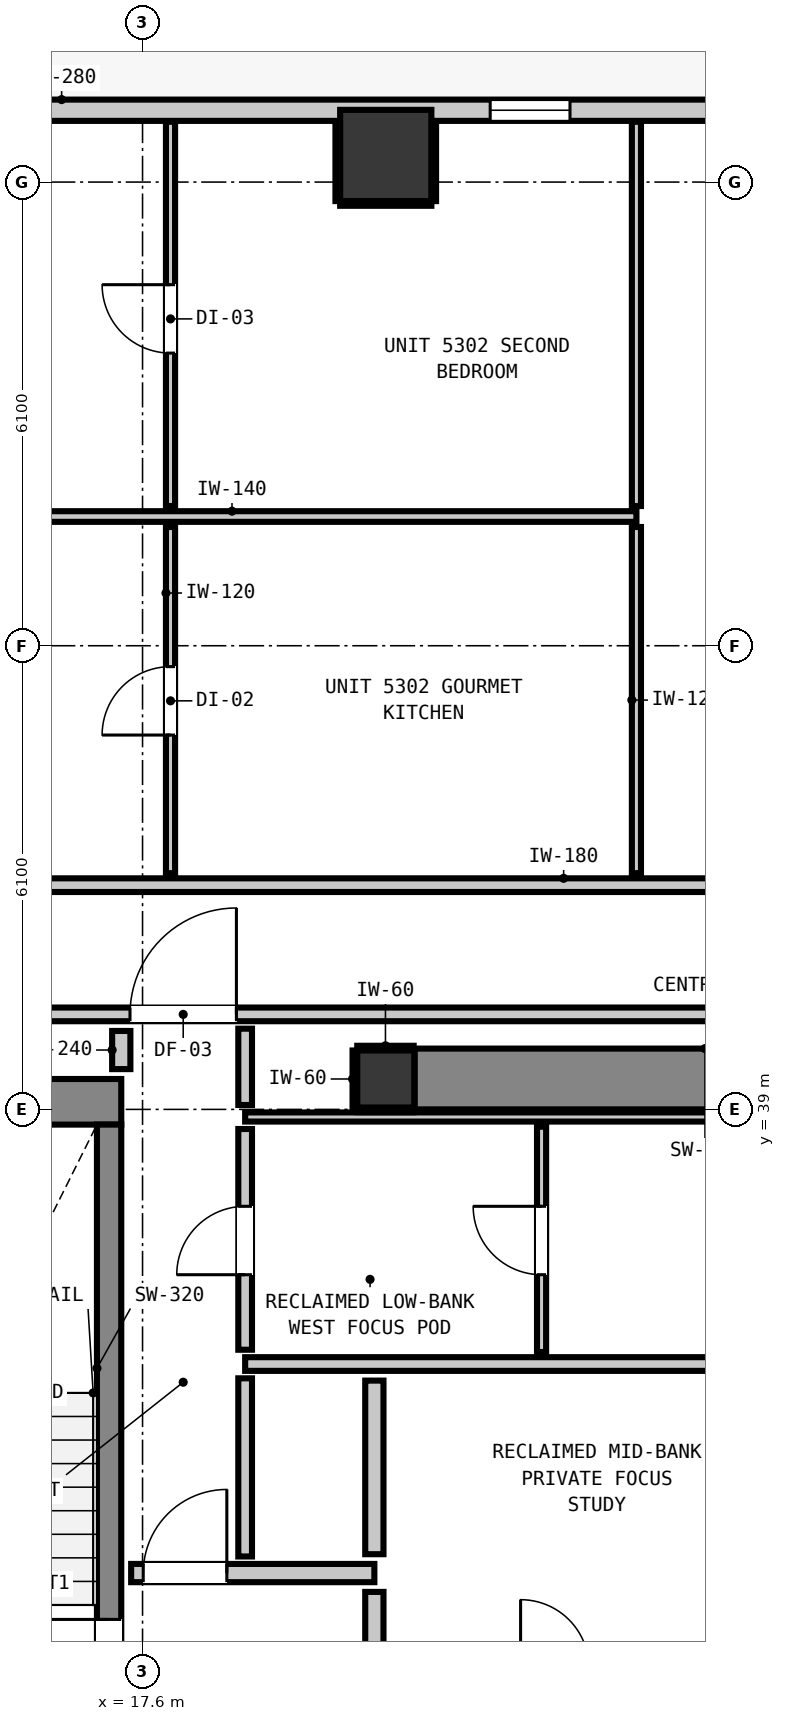
"""IFC4 building model, lengths in metres.
Left out: names, types, materials, properties, quantities, classifications, styles, units other than length and angle.
Written with IfcOpenShell. Run it as: python <this file> out.ifc"""

import sys

from ifc_helpers import new_model, si_unit, direction, frame, frame_2d, origin, origin_2d, place, context, subcontext, project, spatial, rectangle, extrude, element, fill, save


model = new_model("IFC4")
c1 = context("Model", 3, precision=1e-05, world=origin(), true_north=direction((0.0, 1.0)))
c2 = subcontext(c1, "Body", "Model", "MODEL_VIEW")
j1 = project(units=[si_unit("LENGTHUNIT", "METRE"), si_unit("PLANEANGLEUNIT", "RADIAN")], contexts=[c1])
p1 = place(None, origin())
s1 = spatial("IfcSite", under=j1, at=p1, CompositionType="ELEMENT")
p2 = place(p1, origin())
s2 = spatial("IfcBuilding", under=s1, at=p2, CompositionType="ELEMENT")
p3 = place(p2, frame((0.0, 0.0, 183.52)))
s3 = spatial("IfcBuildingStorey", under=s2, at=p3, CompositionType="ELEMENT", Elevation=183.52)
p4 = place(p3, frame((20.8, 39.4, 0.0), z_axis=(0.0, 0.0, 1.0), x_axis=(1.0, 0.0, 0.0)))
e1 = element("IfcColumn", 1, at=p4, inside=s3, PredefinedType="COLUMN", context=c2, shape_type="SweptSolid", body=[
    extrude(rectangle(XDim=0.75, YDim=0.75, at=origin_2d()), origin(), (0.0, 0.0, 1.0), 3.32),
])
p5 = place(p3, frame((13.24, 39.1, 0.0), z_axis=(0.0, 0.0, 1.0), x_axis=(1.0, 0.0, 0.0)))
e2 = element("IfcWall", 2, at=p5, inside=s3, PredefinedType="SHEAR", context=c2, shape_type="SweptSolid", body=[
    extrude(rectangle(XDim=4.08, YDim=0.6, at=frame_2d((2.04, 0.0))), origin(), (0.0, 0.0, 1.0), 3.32),
])
p6 = place(p3, frame((21.18, 39.4, 0.0), z_axis=(0.0, 0.0, 1.0), x_axis=(1.0, 0.0, 0.0)))
e3 = element("IfcWall", 3, at=p6, inside=s3, PredefinedType="SHEAR", context=c2, shape_type="SweptSolid", body=[
    extrude(rectangle(XDim=7.64, YDim=0.8, at=frame_2d((3.82, 0.0))), origin(), (0.0, 0.0, 1.0), 3.32),
])
p7 = place(p3, frame((17.16, 31.0, 0.0), z_axis=(0.0, 0.0, 1.0), x_axis=(0.0, 1.0, 0.0)))
e4 = element("IfcWall", 4, at=p7, inside=s3, PredefinedType="SHEAR", context=c2, shape_type="SweptSolid", body=[
    extrude(rectangle(XDim=7.8, YDim=0.32, at=frame_2d((3.9, 0.0))), origin(), (0.0, 0.0, 1.0), 3.32),
])
p8 = place(p7, frame((0.19, 0.0, 0.0)))
e5 = element("IfcOpeningElement", 5, at=p8, cuts=e4, PredefinedType="OPENING", context=c2, shape_type="SweptSolid", body=[
    extrude(rectangle(XDim=1.1, YDim=2.15, at=frame_2d((0.55, 1.075))), frame((0.0, 0.17, 0.0), z_axis=(0.0, -1.0, 0.0), x_axis=(1.0, 0.0, 0.0)), (0.0, 0.0, 1.0), 0.34),
])
p9 = place(p3, frame((20.8, 51.55, 0.0), z_axis=(0.0, 0.0, 1.0), x_axis=(1.0, 0.0, 0.0)))
e6 = element("IfcColumn", 6, at=p9, inside=s3, PredefinedType="COLUMN", context=c2, shape_type="SweptSolid", body=[
    extrude(rectangle(XDim=1.2, YDim=1.2, at=origin_2d()), origin(), (0.0, 0.0, 1.0), 3.32),
])
p10 = place(p3, frame((5.355, 52.145, 0.0), z_axis=(0.0, 0.0, 1.0), x_axis=(1.0, 0.0, 0.0)))
e7 = element("IfcWall", 7, at=p10, inside=s3, PredefinedType="STANDARD", context=c2, shape_type="SweptSolid", body=[
    extrude(rectangle(XDim=35.09, YDim=0.28, at=frame_2d((17.545, 0.0))), origin(), (0.0, 0.0, 1.0), 3.08),
])
p11 = place(p10, frame((0.904, 0.0, 0.0)))
e8 = element("IfcOpeningElement", 8, at=p11, cuts=e7, PredefinedType="OPENING", context=c2, shape_type="SweptSolid", body=[
    extrude(rectangle(XDim=1.0, YDim=2.15, at=frame_2d((0.5, 1.075))), frame((0.0, 0.15, 0.0), z_axis=(0.0, -1.0, 0.0), x_axis=(1.0, 0.0, 0.0)), (0.0, 0.0, 1.0), 0.3),
])
p12 = place(p10, frame((4.492, 0.0, 0.85)))
e9 = element("IfcOpeningElement", 9, at=p12, cuts=e7, PredefinedType="OPENING", context=c2, shape_type="SweptSolid", body=[
    extrude(rectangle(XDim=1.05, YDim=1.65, at=frame_2d((0.525, 0.825))), frame((0.0, 0.15, 0.0), z_axis=(0.0, -1.0, 0.0), x_axis=(1.0, 0.0, 0.0)), (0.0, 0.0, 1.0), 0.3),
])
p13 = place(p10, frame((16.819, 0.0, 0.85)))
e10 = element("IfcOpeningElement", 10, at=p13, cuts=e7, PredefinedType="OPENING", context=c2, shape_type="SweptSolid", body=[
    extrude(rectangle(XDim=1.05, YDim=1.65, at=frame_2d((0.525, 0.825))), frame((0.0, 0.15, 0.0), z_axis=(0.0, -1.0, 0.0), x_axis=(1.0, 0.0, 0.0)), (0.0, 0.0, 1.0), 0.3),
])
p14 = place(p10, frame((26.97, 0.0, 0.85)))
e11 = element("IfcOpeningElement", 11, at=p14, cuts=e7, PredefinedType="OPENING", context=c2, shape_type="SweptSolid", body=[
    extrude(rectangle(XDim=1.05, YDim=1.65, at=frame_2d((0.525, 0.825))), frame((0.0, 0.15, 0.0), z_axis=(0.0, -1.0, 0.0), x_axis=(1.0, 0.0, 0.0)), (0.0, 0.0, 1.0), 0.3),
])
p15 = place(p3, frame((17.45, 32.9, 0.0), z_axis=(0.0, 0.0, 1.0), x_axis=(1.0, 0.0, 0.0)))
e12 = element("IfcWall", 12, at=p15, inside=s3, PredefinedType="PARTITIONING", context=c2, shape_type="SweptSolid", body=[
    extrude(rectangle(XDim=3.2, YDim=0.24, at=frame_2d((1.6, 0.0))), origin(), (0.0, 0.0, 1.0), 3.08),
])
p16 = place(p15, frame((0.159, 0.0, 0.0)))
e13 = element("IfcOpeningElement", 13, at=p16, cuts=e12, PredefinedType="OPENING", context=c2, shape_type="SweptSolid", body=[
    extrude(rectangle(XDim=1.1, YDim=2.15, at=frame_2d((0.55, 1.075))), frame((0.0, 0.13, 0.0), z_axis=(0.0, -1.0, 0.0), x_axis=(1.0, 0.0, 0.0)), (0.0, 0.0, 1.0), 0.26),
])
p17 = place(p3, frame((18.95, 35.65, 0.0), z_axis=(0.0, 0.0, 1.0), x_axis=(1.0, 0.0, 0.0)))
e14 = element("IfcWall", 14, at=p17, inside=s3, PredefinedType="PARTITIONING", context=c2, shape_type="SweptSolid", body=[
    extrude(rectangle(XDim=11.025, YDim=0.18, at=frame_2d((5.513, 0.0))), origin(), (0.0, 0.0, 1.0), 3.08),
])
p18 = place(p3, frame((3.207, 40.25, 0.0), z_axis=(0.0, 0.0, 1.0), x_axis=(1.0, 0.0, 0.0)))
e15 = element("IfcWall", 15, at=p18, inside=s3, PredefinedType="PARTITIONING", context=c2, shape_type="SweptSolid", body=[
    extrude(rectangle(XDim=39.386, YDim=0.18, at=frame_2d((19.693, 0.0))), origin(), (0.0, 0.0, 1.0), 3.08),
])
p19 = place(p18, frame((14.228, 0.0, 0.0)))
e16 = element("IfcOpeningElement", 16, at=p19, cuts=e15, PredefinedType="OPENING", context=c2, shape_type="SweptSolid", body=[
    extrude(rectangle(XDim=1.4, YDim=2.15, at=frame_2d((0.7, 1.075))), frame((0.0, 0.1, 0.0), z_axis=(0.0, -1.0, 0.0), x_axis=(1.0, 0.0, 0.0)), (0.0, 0.0, 1.0), 0.2),
])
p20 = place(p18, frame((1.267, 0.0, 0.0)))
e17 = element("IfcOpeningElement", 17, at=p20, cuts=e15, PredefinedType="OPENING", context=c2, shape_type="SweptSolid", body=[
    extrude(rectangle(XDim=0.9, YDim=2.1, at=frame_2d((0.45, 1.05))), frame((0.0, 0.1, 0.0), z_axis=(0.0, -1.0, 0.0), x_axis=(1.0, 0.0, 0.0)), (0.0, 0.0, 1.0), 0.2),
])
p21 = place(p18, frame((5.694, 0.0, 0.0)))
e18 = element("IfcOpeningElement", 18, at=p21, cuts=e15, PredefinedType="OPENING", context=c2, shape_type="SweptSolid", body=[
    extrude(rectangle(XDim=0.95, YDim=2.1, at=frame_2d((0.475, 1.05))), frame((0.0, 0.1, 0.0), z_axis=(0.0, -1.0, 0.0), x_axis=(1.0, 0.0, 0.0)), (0.0, 0.0, 1.0), 0.2),
])
p22 = place(p18, frame((36.494, 0.0, 0.0)))
e19 = element("IfcOpeningElement", 19, at=p22, cuts=e15, PredefinedType="OPENING", context=c2, shape_type="SweptSolid", body=[
    extrude(rectangle(XDim=0.9, YDim=2.1, at=frame_2d((0.45, 1.05))), frame((0.0, 0.1, 0.0), z_axis=(0.0, -1.0, 0.0), x_axis=(1.0, 0.0, 0.0)), (0.0, 0.0, 1.0), 0.2),
])
p23 = place(p3, frame((3.207, 41.95, 0.0), z_axis=(0.0, 0.0, 1.0), x_axis=(1.0, 0.0, 0.0)))
e20 = element("IfcWall", 20, at=p23, inside=s3, PredefinedType="PARTITIONING", context=c2, shape_type="SweptSolid", body=[
    extrude(rectangle(XDim=39.386, YDim=0.18, at=frame_2d((19.693, 0.0))), origin(), (0.0, 0.0, 1.0), 3.08),
])
p24 = place(p23, frame((9.199, 0.0, 0.0)))
e21 = element("IfcOpeningElement", 21, at=p24, cuts=e20, PredefinedType="OPENING", context=c2, shape_type="SweptSolid", body=[
    extrude(rectangle(XDim=1.0, YDim=2.15, at=frame_2d((0.5, 1.075))), frame((0.0, 0.1, 0.0), z_axis=(0.0, -1.0, 0.0), x_axis=(1.0, 0.0, 0.0)), (0.0, 0.0, 1.0), 0.2),
])
p25 = place(p23, frame((29.668, 0.0, 0.0)))
e22 = element("IfcOpeningElement", 22, at=p25, cuts=e20, PredefinedType="OPENING", context=c2, shape_type="SweptSolid", body=[
    extrude(rectangle(XDim=0.9, YDim=2.1, at=frame_2d((0.45, 1.05))), frame((0.0, 0.1, 0.0), z_axis=(0.0, -1.0, 0.0), x_axis=(1.0, 0.0, 0.0)), (0.0, 0.0, 1.0), 0.2),
])
p26 = place(p3, frame((3.207, 46.8, 0.0), z_axis=(0.0, 0.0, 1.0), x_axis=(1.0, 0.0, 0.0)))
e23 = element("IfcWall", 23, at=p26, inside=s3, PredefinedType="PARTITIONING", context=c2, shape_type="SweptSolid", body=[
    extrude(rectangle(XDim=20.891, YDim=0.14, at=frame_2d((10.445, 0.0))), origin(), (0.0, 0.0, 1.0), 3.08),
])
p27 = place(p26, frame((9.249, 0.0, 0.0)))
e24 = element("IfcOpeningElement", 24, at=p27, cuts=e23, PredefinedType="OPENING", context=c2, shape_type="SweptSolid", body=[
    extrude(rectangle(XDim=0.9, YDim=2.1, at=frame_2d((0.45, 1.05))), frame((0.0, 0.08, 0.0), z_axis=(0.0, -1.0, 0.0), x_axis=(1.0, 0.0, 0.0)), (0.0, 0.0, 1.0), 0.16),
])
p28 = place(p3, frame((18.95, 38.9, 0.0), z_axis=(0.0, 0.0, 1.0), x_axis=(1.0, 0.0, 0.0)))
e25 = element("IfcWall", 25, at=p28, inside=s3, PredefinedType="PARTITIONING", context=c2, shape_type="SweptSolid", body=[
    extrude(rectangle(XDim=11.025, YDim=0.12, at=frame_2d((5.513, 0.0))), origin(), (0.0, 0.0, 1.0), 3.08),
])
p29 = place(p3, frame((17.32, 39.53, 0.0), z_axis=(0.0, 0.0, 1.0), x_axis=(0.0, 1.0, 0.0)))
e26 = element("IfcWall", 26, at=p29, inside=s3, PredefinedType="PARTITIONING", context=c2, shape_type="SweptSolid", body=[
    extrude(rectangle(XDim=0.502, YDim=0.24, at=frame_2d((0.251, 0.0))), origin(), (0.0, 0.0, 1.0), 3.08),
])
p30 = place(p3, frame((20.65, 31.868, 0.0), z_axis=(0.0, 0.0, 1.0), x_axis=(0.0, 1.0, 0.0)))
e27 = element("IfcWall", 27, at=p30, inside=s3, PredefinedType="PARTITIONING", context=c2, shape_type="SweptSolid", body=[
    extrude(rectangle(XDim=0.784, YDim=0.24, at=frame_2d((0.392, 0.0))), origin(), (0.0, 0.0, 1.0), 2.315),
])
p31 = place(p3, frame((20.65, 33.148, 0.0), z_axis=(0.0, 0.0, 1.0), x_axis=(0.0, 1.0, 0.0)))
e28 = element("IfcWall", 28, at=p31, inside=s3, PredefinedType="PARTITIONING", context=c2, shape_type="SweptSolid", body=[
    extrude(rectangle(XDim=2.284, YDim=0.24, at=frame_2d((1.142, 0.0))), origin(), (0.0, 0.0, 1.0), 2.315),
])
p32 = place(p3, frame((18.95, 33.118, 0.0), z_axis=(0.0, 0.0, 1.0), x_axis=(0.0, 1.0, 0.0)))
e29 = element("IfcWall", 29, at=p32, inside=s3, PredefinedType="PARTITIONING", context=c2, shape_type="SweptSolid", body=[
    extrude(rectangle(XDim=2.344, YDim=0.18, at=frame_2d((1.172, 0.0))), origin(), (0.0, 0.0, 1.0), 3.08),
])
p33 = place(p3, frame((18.95, 35.838, 0.0), z_axis=(0.0, 0.0, 1.0), x_axis=(0.0, 1.0, 0.0)))
e30 = element("IfcWall", 30, at=p33, inside=s3, PredefinedType="PARTITIONING", context=c2, shape_type="SweptSolid", body=[
    extrude(rectangle(XDim=2.904, YDim=0.18, at=frame_2d((1.452, 0.0))), origin(), (0.0, 0.0, 1.0), 3.08),
])
p34 = place(p33, frame((0.987, 0.0, 0.0)))
e31 = element("IfcOpeningElement", 31, at=p34, cuts=e30, PredefinedType="OPENING", context=c2, shape_type="SweptSolid", body=[
    extrude(rectangle(XDim=0.9, YDim=2.1, at=frame_2d((0.45, 1.05))), frame((0.0, 0.1, 0.0), z_axis=(0.0, -1.0, 0.0), x_axis=(1.0, 0.0, 0.0)), (0.0, 0.0, 1.0), 0.2),
])
p35 = place(p3, frame((18.95, 39.058, 0.0), z_axis=(0.0, 0.0, 1.0), x_axis=(0.0, 1.0, 0.0)))
e32 = element("IfcWall", 32, at=p35, inside=s3, PredefinedType="PARTITIONING", context=c2, shape_type="SweptSolid", body=[
    extrude(rectangle(XDim=1.004, YDim=0.18, at=frame_2d((0.502, 0.0))), origin(), (0.0, 0.0, 1.0), 3.08),
])
p36 = place(p3, frame((17.968, 42.108, 0.0), z_axis=(0.0, 0.0, 1.0), x_axis=(0.0, 1.0, 0.0)))
e33 = element("IfcWall", 33, at=p36, inside=s3, PredefinedType="PARTITIONING", context=c2, shape_type="SweptSolid", body=[
    extrude(rectangle(XDim=4.554, YDim=0.12, at=frame_2d((2.277, 0.0))), origin(), (0.0, 0.0, 1.0), 3.08),
])
p37 = place(p36, frame((1.817, 0.0, 0.0)))
e34 = element("IfcOpeningElement", 34, at=p37, cuts=e33, PredefinedType="OPENING", context=c2, shape_type="SweptSolid", body=[
    extrude(rectangle(XDim=0.9, YDim=2.1, at=frame_2d((0.45, 1.05))), frame((0.0, 0.07, 0.0), z_axis=(0.0, -1.0, 0.0), x_axis=(1.0, 0.0, 0.0)), (0.0, 0.0, 1.0), 0.14),
])
p38 = place(p3, frame((17.968, 46.938, 0.0), z_axis=(0.0, 0.0, 1.0), x_axis=(0.0, 1.0, 0.0)))
e35 = element("IfcWall", 35, at=p38, inside=s3, PredefinedType="PARTITIONING", context=c2, shape_type="SweptSolid", body=[
    extrude(rectangle(XDim=5.055, YDim=0.12, at=frame_2d((2.527, 0.0))), origin(), (0.0, 0.0, 1.0), 3.08),
])
p39 = place(p38, frame((2.012, 0.0, 0.0)))
e36 = element("IfcOpeningElement", 36, at=p39, cuts=e35, PredefinedType="OPENING", context=c2, shape_type="SweptSolid", body=[
    extrude(rectangle(XDim=0.9, YDim=2.1, at=frame_2d((0.45, 1.05))), frame((0.0, 0.07, 0.0), z_axis=(0.0, -1.0, 0.0), x_axis=(1.0, 0.0, 0.0)), (0.0, 0.0, 1.0), 0.14),
])
p40 = place(p3, frame((22.85, 35.808, 0.0), z_axis=(0.0, 0.0, 1.0), x_axis=(0.0, 1.0, 0.0)))
e37 = element("IfcWall", 37, at=p40, inside=s3, PredefinedType="PARTITIONING", context=c2, shape_type="SweptSolid", body=[
    extrude(rectangle(XDim=2.964, YDim=0.12, at=frame_2d((1.482, 0.0))), origin(), (0.0, 0.0, 1.0), 3.08),
])
p41 = place(p40, frame((1.017, 0.0, 0.0)))
e38 = element("IfcOpeningElement", 38, at=p41, cuts=e37, PredefinedType="OPENING", context=c2, shape_type="SweptSolid", body=[
    extrude(rectangle(XDim=0.9, YDim=2.1, at=frame_2d((0.45, 1.05))), frame((0.0, 0.07, 0.0), z_axis=(0.0, -1.0, 0.0), x_axis=(1.0, 0.0, 0.0)), (0.0, 0.0, 1.0), 0.14),
])
p42 = place(p3, frame((24.098, 42.108, 0.0), z_axis=(0.0, 0.0, 1.0), x_axis=(0.0, 1.0, 0.0)))
e39 = element("IfcWall", 39, at=p42, inside=s3, PredefinedType="PARTITIONING", context=c2, shape_type="SweptSolid", body=[
    extrude(rectangle(XDim=4.554, YDim=0.12, at=frame_2d((2.277, 0.0))), origin(), (0.0, 0.0, 1.0), 3.08),
])
p43 = place(p3, frame((24.098, 46.938, 0.0), z_axis=(0.0, 0.0, 1.0), x_axis=(0.0, 1.0, 0.0)))
e40 = element("IfcWall", 40, at=p43, inside=s3, PredefinedType="PARTITIONING", context=c2, shape_type="SweptSolid", body=[
    extrude(rectangle(XDim=5.055, YDim=0.12, at=frame_2d((2.527, 0.0))), origin(), (0.0, 0.0, 1.0), 3.08),
])
for number, where, z_axis, x_axis in (
    (41, (20.425, 38.993, 0.0), (0.0, 0.0, 1.0), (1.0, 0.0, 0.0)),
    (42, (20.425, 39.807, 0.0), (0.0, 0.0, 1.0), (1.0, 0.0, 0.0)),
):
    element("IfcWall", number, at=place(p3, frame(where, z_axis=z_axis, x_axis=x_axis)), inside=s3, PredefinedType="PARTITIONING", context=c2, shape_type="SweptSolid", body=[
        extrude(rectangle(XDim=0.742, YDim=0.06, at=frame_2d((0.371, 0.0))), origin(), (0.0, 0.0, 1.0), 1.45),
    ])
p44 = place(p3, frame((20.393, 39.025, 0.0), z_axis=(0.0, 0.0, 1.0), x_axis=(0.0, 1.0, 0.0)))
e43 = element("IfcWall", 43, at=p44, inside=s3, PredefinedType="PARTITIONING", context=c2, shape_type="SweptSolid", body=[
    extrude(rectangle(XDim=0.75, YDim=0.06, at=frame_2d((0.375, 0.0))), origin(), (0.0, 0.0, 1.0), 1.45),
])
p45 = place(p3, frame((20.2, 50.918, 0.0), z_axis=(0.0, 0.0, 1.0), x_axis=(1.0, 0.0, 0.0)))
e44 = element("IfcWall", 44, at=p45, inside=s3, PredefinedType="PARTITIONING", context=c2, shape_type="SweptSolid", body=[
    extrude(rectangle(XDim=1.2, YDim=0.06, at=frame_2d((0.6, 0.0))), origin(), (0.0, 0.0, 1.0), 1.45),
])
for number, where, z_axis, x_axis in (
    (45, (20.168, 50.95, 0.0), (0.0, 0.0, 1.0), (0.0, 1.0, 0.0)),
    (46, (21.432, 50.95, 0.0), (0.0, 0.0, 1.0), (0.0, 1.0, 0.0)),
):
    element("IfcWall", number, at=place(p3, frame(where, z_axis=z_axis, x_axis=x_axis)), inside=s3, PredefinedType="PARTITIONING", context=c2, shape_type="SweptSolid", body=[
        extrude(rectangle(XDim=1.04, YDim=0.06, at=frame_2d((0.52, 0.0))), origin(), (0.0, 0.0, 1.0), 1.45),
    ])
p46 = place(p13, origin())
e47 = element("IfcWindow", 47, at=p46, inside=s3, PartitioningType="SINGLE_PANEL", PredefinedType="WINDOW", context=c2, shape_type="SweptSolid", body=[
    extrude(rectangle(XDim=1.05, YDim=1.65, at=frame_2d((0.525, 0.825))), frame((0.0, 0.03, 0.0), z_axis=(0.0, -1.0, 0.0), x_axis=(1.0, 0.0, 0.0)), (0.0, 0.0, 1.0), 0.06),
])
fill(e10, e47)
p47 = place(p8, origin())
e48 = element("IfcDoor", 48, at=p47, inside=s3, OperationType="SINGLE_SWING_RIGHT", PredefinedType="DOOR", context=c2, shape_type="SweptSolid", body=[
    extrude(rectangle(XDim=1.1, YDim=2.15, at=frame_2d((0.55, 1.075))), frame((0.0, 0.025, 0.0), z_axis=(0.0, -1.0, 0.0), x_axis=(1.0, 0.0, 0.0)), (0.0, 0.0, 1.0), 0.05),
])
fill(e5, e48)
p48 = place(p16, origin())
e49 = element("IfcDoor", 49, at=p48, inside=s3, OperationType="SINGLE_SWING_RIGHT", PredefinedType="DOOR", context=c2, shape_type="SweptSolid", body=[
    extrude(rectangle(XDim=1.1, YDim=2.15, at=frame_2d((0.55, 1.075))), frame((0.0, 0.025, 0.0), z_axis=(0.0, -1.0, 0.0), x_axis=(1.0, 0.0, 0.0)), (0.0, 0.0, 1.0), 0.05),
])
fill(e13, e49)
p49 = place(p19, origin())
e50 = element("IfcDoor", 50, at=p49, inside=s3, OperationType="SINGLE_SWING_RIGHT", PredefinedType="DOOR", context=c2, shape_type="SweptSolid", body=[
    extrude(rectangle(XDim=1.4, YDim=2.15, at=frame_2d((0.7, 1.075))), frame((0.0, 0.025, 0.0), z_axis=(0.0, -1.0, 0.0), x_axis=(1.0, 0.0, 0.0)), (0.0, 0.0, 1.0), 0.05),
])
fill(e16, e50)
p50 = place(p34, origin())
e51 = element("IfcDoor", 51, at=p50, inside=s3, OperationType="SINGLE_SWING_LEFT", PredefinedType="DOOR", context=c2, shape_type="SweptSolid", body=[
    extrude(rectangle(XDim=0.9, YDim=2.1, at=frame_2d((0.45, 1.05))), frame((0.0, 0.025, 0.0), z_axis=(0.0, -1.0, 0.0), x_axis=(1.0, 0.0, 0.0)), (0.0, 0.0, 1.0), 0.05),
])
fill(e31, e51)
p51 = place(p41, origin())
e52 = element("IfcDoor", 52, at=p51, inside=s3, OperationType="SINGLE_SWING_RIGHT", PredefinedType="DOOR", context=c2, shape_type="SweptSolid", body=[
    extrude(rectangle(XDim=0.9, YDim=2.1, at=frame_2d((0.45, 1.05))), frame((0.0, 0.025, 0.0), z_axis=(0.0, -1.0, 0.0), x_axis=(1.0, 0.0, 0.0)), (0.0, 0.0, 1.0), 0.05),
])
fill(e38, e52)
p52 = place(p37, origin())
e53 = element("IfcDoor", 53, at=p52, inside=s3, OperationType="SINGLE_SWING_LEFT", PredefinedType="DOOR", context=c2, shape_type="SweptSolid", body=[
    extrude(rectangle(XDim=0.9, YDim=2.1, at=frame_2d((0.45, 1.05))), frame((0.0, 0.025, 0.0), z_axis=(0.0, -1.0, 0.0), x_axis=(1.0, 0.0, 0.0)), (0.0, 0.0, 1.0), 0.05),
])
fill(e34, e53)
p53 = place(p39, origin())
e54 = element("IfcDoor", 54, at=p53, inside=s3, OperationType="SINGLE_SWING_RIGHT", PredefinedType="DOOR", context=c2, shape_type="SweptSolid", body=[
    extrude(rectangle(XDim=0.9, YDim=2.1, at=frame_2d((0.45, 1.05))), frame((0.0, 0.025, 0.0), z_axis=(0.0, -1.0, 0.0), x_axis=(1.0, 0.0, 0.0)), (0.0, 0.0, 1.0), 0.05),
])
fill(e36, e54)
save(model, sys.argv[1])
